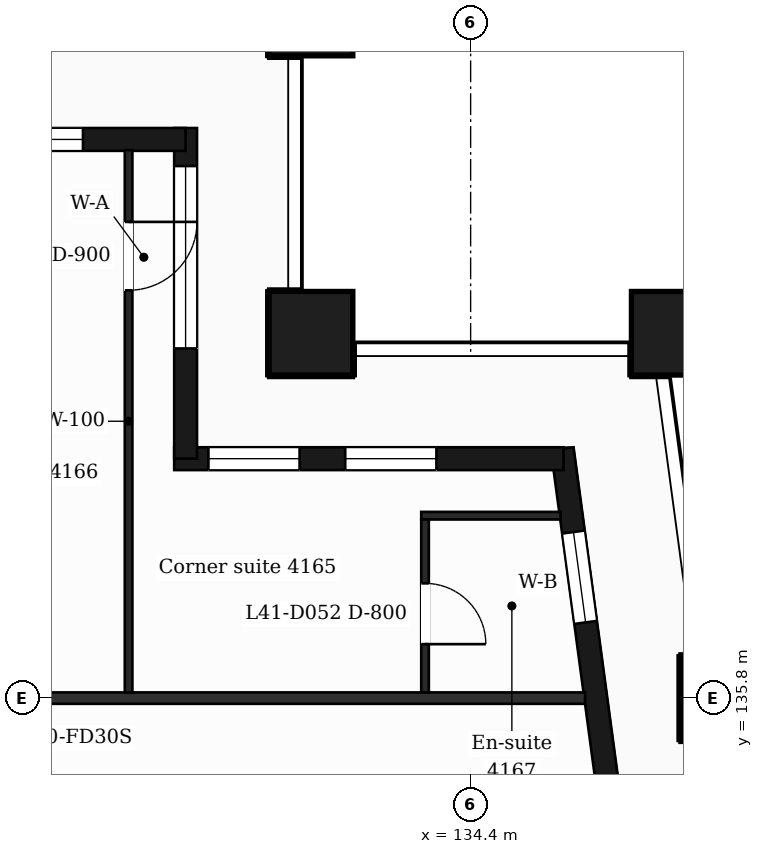
"""IFC4 building model, lengths in metres.
Left out: names, types, materials, properties, quantities, classifications, styles, units other than length and angle.
Written with IfcOpenShell. Run it as: python <this file> out.ifc"""

import sys

from ifc_helpers import new_model, si_unit, direction, frame, frame_2d, origin, origin_2d, place, context, subcontext, project, spatial, rectangle, extrude, element, fill, save


model = new_model("IFC4")
c1 = context("Model", 3, precision=1e-05, world=origin(), true_north=direction((0.0, 1.0)))
c2 = subcontext(c1, "Body", "Model", "MODEL_VIEW")
j1 = project(units=[si_unit("LENGTHUNIT", "METRE"), si_unit("PLANEANGLEUNIT", "RADIAN")], contexts=[c1])
p1 = place(None, origin())
s1 = spatial("IfcSite", under=j1, at=p1, CompositionType="ELEMENT")
p2 = place(p1, origin())
s2 = spatial("IfcBuilding", under=s1, at=p2, CompositionType="ELEMENT")
p3 = place(p2, frame((0.0, 0.0, 173.7)))
s3 = spatial("IfcBuildingStorey", under=s2, at=p3, CompositionType="ELEMENT", Elevation=173.7)
for number, where, z_axis, x_axis in (
    (1, (132.3, 140.6, 0.0), (0.0, 0.0, 1.0), (1.0, 0.0, 0.0)),
    (2, (137.065, 140.6, 0.0), (0.0, 0.0, 1.0), (1.0, 0.0, 0.0)),
    (3, (137.711, 135.8, 0.0), (0.0, 0.0, 1.0), (1.0, 0.0, 0.0)),
    (4, (132.3, 144.8, 0.0), (0.0, 0.0, 1.0), (1.0, 0.0, 0.0)),
):
    element("IfcColumn", number, at=place(p3, frame(where, z_axis=z_axis, x_axis=x_axis)), inside=s3, PredefinedType="COLUMN", context=c2, shape_type="SweptSolid", body=[
        extrude(rectangle(XDim=1.1, YDim=1.1, at=origin_2d()), origin(), (0.0, 0.0, 1.0), 3.7),
    ])
p4 = place(p3, frame((136.504, 132.4, 0.0), z_axis=(0.0, 0.0, 1.0), x_axis=(-0.133399697462, 0.99106231929, 0.0)))
e5 = element("IfcWall", 5, at=p4, inside=s3, PredefinedType="SOLIDWALL", context=c2, shape_type="SweptSolid", body=[
    extrude(rectangle(XDim=6.74, YDim=0.3, at=frame_2d((3.37, 0.0))), origin(), (0.0, 0.0, 1.0), 3.38),
])
p5 = place(p4, frame((1.115, 0.0, 0.0)))
e6 = element("IfcOpeningElement", 6, at=p5, cuts=e5, PredefinedType="OPENING", context=c2, shape_type="SweptSolid", body=[
    extrude(rectangle(XDim=1.2, YDim=2.4, at=frame_2d((0.6, 1.2))), frame((0.0, 0.16, 0.0), z_axis=(0.0, -1.0, 0.0), x_axis=(1.0, 0.0, 0.0)), (0.0, 0.0, 1.0), 0.32),
])
p6 = place(p4, frame((4.436, 0.0, 0.9)))
e7 = element("IfcOpeningElement", 7, at=p6, cuts=e5, PredefinedType="OPENING", context=c2, shape_type="SweptSolid", body=[
    extrude(rectangle(XDim=1.2, YDim=2.1, at=frame_2d((0.6, 1.05))), frame((0.0, 0.16, 0.0), z_axis=(0.0, -1.0, 0.0), x_axis=(1.0, 0.0, 0.0)), (0.0, 0.0, 1.0), 0.32),
])
p7 = place(p3, frame((135.623, 138.95, 0.0), z_axis=(0.0, 0.0, 1.0), x_axis=(-1.0, 0.0, 0.0)))
e8 = element("IfcWall", 8, at=p7, inside=s3, PredefinedType="SOLIDWALL", context=c2, shape_type="SweptSolid", body=[
    extrude(rectangle(XDim=5.123, YDim=0.3, at=frame_2d((2.561, 0.0))), origin(), (0.0, 0.0, 1.0), 3.38),
])
p8 = place(p7, frame((1.673, 0.0, 0.9)))
e9 = element("IfcOpeningElement", 9, at=p8, cuts=e8, PredefinedType="OPENING", context=c2, shape_type="SweptSolid", body=[
    extrude(rectangle(XDim=1.2, YDim=2.1, at=frame_2d((0.6, 1.05))), frame((0.0, 0.16, 0.0), z_axis=(0.0, -1.0, 0.0), x_axis=(1.0, 0.0, 0.0)), (0.0, 0.0, 1.0), 0.32),
])
p9 = place(p7, frame((3.473, 0.0, 0.9)))
e10 = element("IfcOpeningElement", 10, at=p9, cuts=e8, PredefinedType="OPENING", context=c2, shape_type="SweptSolid", body=[
    extrude(rectangle(XDim=1.2, YDim=2.1, at=frame_2d((0.6, 1.05))), frame((0.0, 0.16, 0.0), z_axis=(0.0, -1.0, 0.0), x_axis=(1.0, 0.0, 0.0)), (0.0, 0.0, 1.0), 0.32),
])
p10 = place(p3, frame((130.65, 138.95, 0.0), z_axis=(0.0, 0.0, 1.0), x_axis=(0.0, 1.0, 0.0)))
e11 = element("IfcWall", 11, at=p10, inside=s3, PredefinedType="SOLIDWALL", context=c2, shape_type="SweptSolid", body=[
    extrude(rectangle(XDim=4.35, YDim=0.3, at=frame_2d((2.175, 0.0))), origin(), (0.0, 0.0, 1.0), 3.38),
])
p11 = place(p10, frame((1.45, 0.0, 0.9)))
e12 = element("IfcOpeningElement", 12, at=p11, cuts=e11, PredefinedType="OPENING", context=c2, shape_type="SweptSolid", body=[
    extrude(rectangle(XDim=2.4, YDim=2.1, at=frame_2d((1.2, 1.05))), frame((0.0, 0.16, 0.0), z_axis=(0.0, -1.0, 0.0), x_axis=(1.0, 0.0, 0.0)), (0.0, 0.0, 1.0), 0.32),
])
p12 = place(p3, frame((130.65, 143.15, 0.0), z_axis=(0.0, 0.0, 1.0), x_axis=(-1.0, 0.0, 0.0)))
e13 = element("IfcWall", 13, at=p12, inside=s3, PredefinedType="SOLIDWALL", context=c2, shape_type="SweptSolid", body=[
    extrude(rectangle(XDim=14.25, YDim=0.3, at=frame_2d((7.125, 0.0))), origin(), (0.0, 0.0, 1.0), 3.38),
])
p13 = place(p12, frame((1.35, 0.0, 0.9)))
e14 = element("IfcOpeningElement", 14, at=p13, cuts=e13, PredefinedType="OPENING", context=c2, shape_type="SweptSolid", body=[
    extrude(rectangle(XDim=2.4, YDim=2.1, at=frame_2d((1.2, 1.05))), frame((0.0, 0.16, 0.0), z_axis=(0.0, -1.0, 0.0), x_axis=(1.0, 0.0, 0.0)), (0.0, 0.0, 1.0), 0.32),
])
p14 = place(p12, frame((5.25, 0.0, 0.0)))
e15 = element("IfcOpeningElement", 15, at=p14, cuts=e13, PredefinedType="OPENING", context=c2, shape_type="SweptSolid", body=[
    extrude(rectangle(XDim=1.2, YDim=2.4, at=frame_2d((0.6, 1.2))), frame((0.0, 0.16, 0.0), z_axis=(0.0, -1.0, 0.0), x_axis=(1.0, 0.0, 0.0)), (0.0, 0.0, 1.0), 0.32),
])
p15 = place(p12, frame((7.05, 0.0, 0.9)))
e16 = element("IfcOpeningElement", 16, at=p15, cuts=e13, PredefinedType="OPENING", context=c2, shape_type="SweptSolid", body=[
    extrude(rectangle(XDim=1.2, YDim=2.1, at=frame_2d((0.6, 1.05))), frame((0.0, 0.16, 0.0), z_axis=(0.0, -1.0, 0.0), x_axis=(1.0, 0.0, 0.0)), (0.0, 0.0, 1.0), 0.32),
])
p16 = place(p12, frame((10.35, 0.0, 0.9)))
e17 = element("IfcOpeningElement", 17, at=p16, cuts=e13, PredefinedType="OPENING", context=c2, shape_type="SweptSolid", body=[
    extrude(rectangle(XDim=1.2, YDim=2.1, at=frame_2d((0.6, 1.05))), frame((0.0, 0.16, 0.0), z_axis=(0.0, -1.0, 0.0), x_axis=(1.0, 0.0, 0.0)), (0.0, 0.0, 1.0), 0.32),
])
p17 = place(p3, frame((90.895, 135.8, 0.0), z_axis=(0.0, 0.0, 1.0), x_axis=(1.0, 0.0, 0.0)))
e18 = element("IfcWall", 18, at=p17, inside=s3, PredefinedType="PARTITIONING", context=c2, shape_type="SweptSolid", body=[
    extrude(rectangle(XDim=45.011, YDim=0.15, at=frame_2d((22.505, 0.0))), origin(), (0.0, 0.0, 1.0), 3.38),
])
p18 = place(p17, frame((6.906, 0.0, 0.0)))
e19 = element("IfcOpeningElement", 19, at=p18, cuts=e18, PredefinedType="OPENING", context=c2, shape_type="SweptSolid", body=[
    extrude(rectangle(XDim=1.0, YDim=2.1, at=frame_2d((0.5, 1.05))), frame((0.0, 0.085, 0.0), z_axis=(0.0, -1.0, 0.0), x_axis=(1.0, 0.0, 0.0)), (0.0, 0.0, 1.0), 0.17),
])
p19 = place(p17, frame((11.875, 0.0, 0.0)))
e20 = element("IfcOpeningElement", 20, at=p19, cuts=e18, PredefinedType="OPENING", context=c2, shape_type="SweptSolid", body=[
    extrude(rectangle(XDim=0.95, YDim=2.1, at=frame_2d((0.475, 1.05))), frame((0.0, 0.085, 0.0), z_axis=(0.0, -1.0, 0.0), x_axis=(1.0, 0.0, 0.0)), (0.0, 0.0, 1.0), 0.17),
])
p20 = place(p17, frame((19.292, 0.0, 0.0)))
e21 = element("IfcOpeningElement", 21, at=p20, cuts=e18, PredefinedType="OPENING", context=c2, shape_type="SweptSolid", body=[
    extrude(rectangle(XDim=0.95, YDim=2.1, at=frame_2d((0.475, 1.05))), frame((0.0, 0.085, 0.0), z_axis=(0.0, -1.0, 0.0), x_axis=(1.0, 0.0, 0.0)), (0.0, 0.0, 1.0), 0.17),
])
p21 = place(p17, frame((23.418, 0.0, 0.0)))
e22 = element("IfcOpeningElement", 22, at=p21, cuts=e18, PredefinedType="OPENING", context=c2, shape_type="SweptSolid", body=[
    extrude(rectangle(XDim=0.95, YDim=2.1, at=frame_2d((0.475, 1.05))), frame((0.0, 0.085, 0.0), z_axis=(0.0, -1.0, 0.0), x_axis=(1.0, 0.0, 0.0)), (0.0, 0.0, 1.0), 0.17),
])
p22 = place(p17, frame((29.425, 0.0, 0.0)))
e23 = element("IfcOpeningElement", 23, at=p22, cuts=e18, PredefinedType="OPENING", context=c2, shape_type="SweptSolid", body=[
    extrude(rectangle(XDim=0.95, YDim=2.1, at=frame_2d((0.475, 1.05))), frame((0.0, 0.085, 0.0), z_axis=(0.0, -1.0, 0.0), x_axis=(1.0, 0.0, 0.0)), (0.0, 0.0, 1.0), 0.17),
])
p23 = place(p17, frame((31.63, 0.0, 0.0)))
e24 = element("IfcOpeningElement", 24, at=p23, cuts=e18, PredefinedType="OPENING", context=c2, shape_type="SweptSolid", body=[
    extrude(rectangle(XDim=0.95, YDim=2.1, at=frame_2d((0.475, 1.05))), frame((0.0, 0.085, 0.0), z_axis=(0.0, -1.0, 0.0), x_axis=(1.0, 0.0, 0.0)), (0.0, 0.0, 1.0), 0.17),
])
p24 = place(p17, frame((36.775, 0.0, 0.0)))
e25 = element("IfcOpeningElement", 25, at=p24, cuts=e18, PredefinedType="OPENING", context=c2, shape_type="SweptSolid", body=[
    extrude(rectangle(XDim=1.0, YDim=2.1, at=frame_2d((0.5, 1.05))), frame((0.0, 0.085, 0.0), z_axis=(0.0, -1.0, 0.0), x_axis=(1.0, 0.0, 0.0)), (0.0, 0.0, 1.0), 0.17),
])
p25 = place(p3, frame((133.75, 138.2, 0.0), z_axis=(0.0, 0.0, 1.0), x_axis=(1.0, 0.0, 0.0)))
e26 = element("IfcWall", 26, at=p25, inside=s3, PredefinedType="PARTITIONING", context=c2, shape_type="SweptSolid", body=[
    extrude(rectangle(XDim=1.832, YDim=0.1, at=frame_2d((0.916, 0.0))), origin(), (0.0, 0.0, 1.0), 3.38),
])
p26 = place(p3, frame((129.9, 135.875, 0.0), z_axis=(0.0, 0.0, 1.0), x_axis=(0.0, 1.0, 0.0)))
e27 = element("IfcWall", 27, at=p26, inside=s3, PredefinedType="PARTITIONING", context=c2, shape_type="SweptSolid", body=[
    extrude(rectangle(XDim=7.135, YDim=0.1, at=frame_2d((3.567, 0.0))), origin(), (0.0, 0.0, 1.0), 3.38),
])
p27 = place(p26, frame((5.29, 0.0, 0.0)))
e28 = element("IfcOpeningElement", 28, at=p27, cuts=e27, PredefinedType="OPENING", context=c2, shape_type="SweptSolid", body=[
    extrude(rectangle(XDim=0.9, YDim=2.1, at=frame_2d((0.45, 1.05))), frame((0.0, 0.06, 0.0), z_axis=(0.0, -1.0, 0.0), x_axis=(1.0, 0.0, 0.0)), (0.0, 0.0, 1.0), 0.12),
])
p28 = place(p3, frame((133.8, 135.875, 0.0), z_axis=(0.0, 0.0, 1.0), x_axis=(0.0, 1.0, 0.0)))
e29 = element("IfcWall", 29, at=p28, inside=s3, PredefinedType="PARTITIONING", context=c2, shape_type="SweptSolid", body=[
    extrude(rectangle(XDim=2.275, YDim=0.1, at=frame_2d((1.137, 0.0))), origin(), (0.0, 0.0, 1.0), 3.38),
])
p29 = place(p28, frame((0.635, 0.0, 0.0)))
e30 = element("IfcOpeningElement", 30, at=p29, cuts=e29, PredefinedType="OPENING", context=c2, shape_type="SweptSolid", body=[
    extrude(rectangle(XDim=0.8, YDim=2.1, at=frame_2d((0.4, 1.05))), frame((0.0, 0.06, 0.0), z_axis=(0.0, -1.0, 0.0), x_axis=(1.0, 0.0, 0.0)), (0.0, 0.0, 1.0), 0.12),
])
p30 = place(p6, origin())
e31 = element("IfcWindow", 31, at=p30, inside=s3, PartitioningType="SINGLE_PANEL", PredefinedType="WINDOW", context=c2, shape_type="SweptSolid", body=[
    extrude(rectangle(XDim=1.2, YDim=2.1, at=frame_2d((0.6, 1.05))), frame((0.0, 0.03, 0.0), z_axis=(0.0, -1.0, 0.0), x_axis=(1.0, 0.0, 0.0)), (0.0, 0.0, 1.0), 0.06),
])
fill(e7, e31)
p31 = place(p8, origin())
e32 = element("IfcWindow", 32, at=p31, inside=s3, PartitioningType="SINGLE_PANEL", PredefinedType="WINDOW", context=c2, shape_type="SweptSolid", body=[
    extrude(rectangle(XDim=1.2, YDim=2.1, at=frame_2d((0.6, 1.05))), frame((0.0, 0.03, 0.0), z_axis=(0.0, -1.0, 0.0), x_axis=(1.0, 0.0, 0.0)), (0.0, 0.0, 1.0), 0.06),
])
fill(e9, e32)
p32 = place(p9, origin())
e33 = element("IfcWindow", 33, at=p32, inside=s3, PartitioningType="SINGLE_PANEL", PredefinedType="WINDOW", context=c2, shape_type="SweptSolid", body=[
    extrude(rectangle(XDim=1.2, YDim=2.1, at=frame_2d((0.6, 1.05))), frame((0.0, 0.03, 0.0), z_axis=(0.0, -1.0, 0.0), x_axis=(1.0, 0.0, 0.0)), (0.0, 0.0, 1.0), 0.06),
])
fill(e10, e33)
p33 = place(p11, origin())
e34 = element("IfcWindow", 34, at=p33, inside=s3, PartitioningType="SINGLE_PANEL", PredefinedType="WINDOW", context=c2, shape_type="SweptSolid", body=[
    extrude(rectangle(XDim=2.4, YDim=2.1, at=frame_2d((1.2, 1.05))), frame((0.0, 0.03, 0.0), z_axis=(0.0, -1.0, 0.0), x_axis=(1.0, 0.0, 0.0)), (0.0, 0.0, 1.0), 0.06),
])
fill(e12, e34)
p34 = place(p13, origin())
e35 = element("IfcWindow", 35, at=p34, inside=s3, PartitioningType="SINGLE_PANEL", PredefinedType="WINDOW", context=c2, shape_type="SweptSolid", body=[
    extrude(rectangle(XDim=2.4, YDim=2.1, at=frame_2d((1.2, 1.05))), frame((0.0, 0.03, 0.0), z_axis=(0.0, -1.0, 0.0), x_axis=(1.0, 0.0, 0.0)), (0.0, 0.0, 1.0), 0.06),
])
fill(e14, e35)
p35 = place(p27, origin())
e36 = element("IfcDoor", 36, at=p35, inside=s3, OperationType="SINGLE_SWING_RIGHT", PredefinedType="DOOR", context=c2, shape_type="SweptSolid", body=[
    extrude(rectangle(XDim=0.9, YDim=2.1, at=frame_2d((0.45, 1.05))), frame((0.0, 0.025, 0.0), z_axis=(0.0, -1.0, 0.0), x_axis=(1.0, 0.0, 0.0)), (0.0, 0.0, 1.0), 0.05),
])
fill(e28, e36)
p36 = place(p29, origin())
e37 = element("IfcDoor", 37, at=p36, inside=s3, OperationType="SINGLE_SWING_LEFT", PredefinedType="DOOR", context=c2, shape_type="SweptSolid", body=[
    extrude(rectangle(XDim=0.8, YDim=2.1, at=frame_2d((0.4, 1.05))), frame((0.0, 0.025, 0.0), z_axis=(0.0, -1.0, 0.0), x_axis=(1.0, 0.0, 0.0)), (0.0, 0.0, 1.0), 0.05),
])
fill(e30, e37)
save(model, sys.argv[1])
